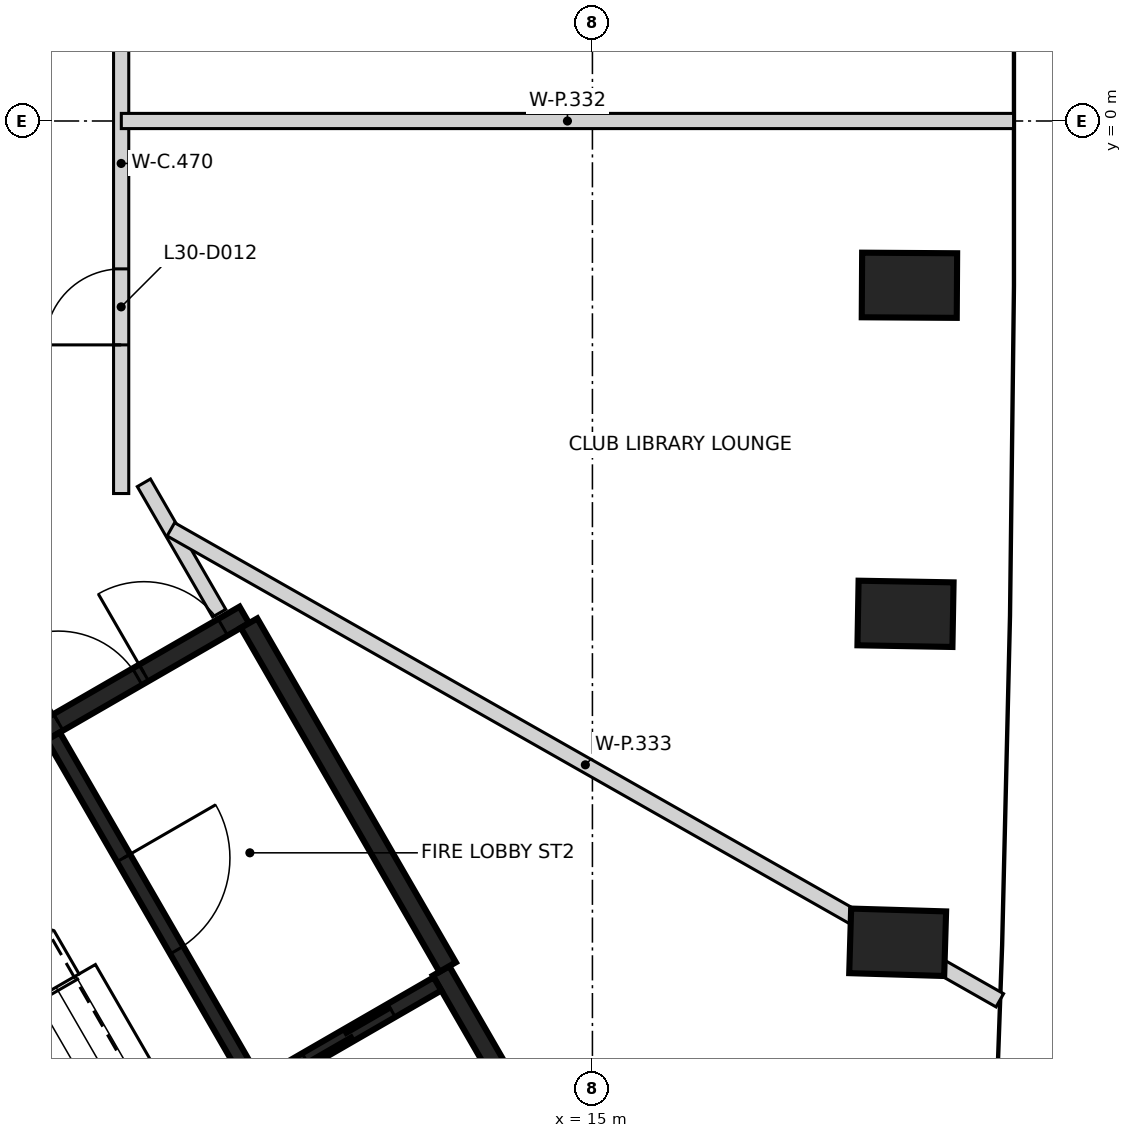
"""IFC4 building model, lengths in metres.
Left out: names, types, materials, properties, quantities, classifications, styles, units other than length and angle.
Written with IfcOpenShell. Run it as: python <this file> out.ifc"""

import sys

from ifc_helpers import new_model, si_unit, direction, frame, frame_2d, origin, origin_2d, place, context, subcontext, project, spatial, rectangle, extrude, element, fill, save


model = new_model("IFC4")
c1 = context("Model", 3, precision=1e-05, world=origin(), true_north=direction((0.0, 1.0)))
c2 = subcontext(c1, "Body", "Model", "MODEL_VIEW")
j1 = project(units=[si_unit("LENGTHUNIT", "METRE"), si_unit("PLANEANGLEUNIT", "RADIAN")], contexts=[c1])
p1 = place(None, origin())
s1 = spatial("IfcSite", under=j1, at=p1, CompositionType="ELEMENT")
p2 = place(p1, origin())
s2 = spatial("IfcBuilding", under=s1, at=p2, CompositionType="ELEMENT")
p3 = place(p2, frame((0.0, 0.0, 123.8)))
s3 = spatial("IfcBuildingStorey", under=s2, at=p3, CompositionType="ELEMENT", Elevation=123.8)
for number, where, z_axis, x_axis in (
    (1, (19.016, -10.805, -0.4), (0.0, 0.0, 1.0), (-1.0, 0.03, 0.0)),
    (2, (19.119, -6.484, -0.4), (0.0, 0.0, 1.0), (-1.0, 0.018, 0.0)),
    (3, (19.171, -2.161, -0.4), (0.0, 0.0, 1.0), (-1.0, 0.006, 0.0)),
):
    element("IfcColumn", number, at=place(p3, frame(where, z_axis=z_axis, x_axis=x_axis)), inside=s3, PredefinedType="COLUMN", context=c2, shape_type="SweptSolid", body=[
        extrude(rectangle(XDim=1.25, YDim=0.85, at=origin_2d()), origin(), (0.0, 0.0, 1.0), 5.0),
    ])
p4 = place(p3, frame((0.417, -12.273, 0.0), z_axis=(0.0, 0.0, 1.0), x_axis=(0.866021906294, 0.500006057782, 0.0)))
e4 = element("IfcWall", 4, at=p4, inside=s3, PredefinedType="SHEAR", context=c2, shape_type="SweptSolid", body=[
    extrude(rectangle(XDim=11.55, YDim=0.25, at=frame_2d((5.775, 0.0))), origin(), (0.0, 0.0, 1.0), 4.6),
])
p5 = place(p4, frame((10.025, 0.0, 0.0)))
e5 = element("IfcOpeningElement", 5, at=p5, cuts=e4, PredefinedType="OPENING", context=c2, shape_type="SweptSolid", body=[
    extrude(rectangle(XDim=1.2, YDim=2.1, at=frame_2d((0.6, 1.05))), frame((0.0, 0.135, 0.0), z_axis=(0.0, -1.0, 0.0), x_axis=(1.0, 0.0, 0.0)), (0.0, 0.0, 1.0), 0.27),
])
p6 = place(p4, frame((8.725, 0.0, 0.0)))
e6 = element("IfcOpeningElement", 6, at=p6, cuts=e4, PredefinedType="OPENING", context=c2, shape_type="SweptSolid", body=[
    extrude(rectangle(XDim=1.2, YDim=2.1, at=frame_2d((0.6, 1.05))), frame((0.0, 0.135, 0.0), z_axis=(0.0, -1.0, 0.0), x_axis=(1.0, 0.0, 0.0)), (0.0, 0.0, 1.0), 0.27),
])
p7 = place(p3, frame((13.008, -11.181, 0.0), z_axis=(0.0, 0.0, 1.0), x_axis=(0.500004234368, -0.866022959057, 0.0)))
e7 = element("IfcWall", 7, at=p7, inside=s3, PredefinedType="SHEAR", context=c2, shape_type="SweptSolid", body=[
    extrude(rectangle(XDim=6.25, YDim=0.25, at=frame_2d((3.125, 0.0))), origin(), (0.0, 0.0, 1.0), 4.6),
])
p8 = place(p3, frame((10.483, -6.606, 0.0), z_axis=(0.0, 0.0, 1.0), x_axis=(0.49999885962, -0.866026062182, 0.0)))
e8 = element("IfcWall", 8, at=p8, inside=s3, PredefinedType="SHEAR", context=c2, shape_type="SweptSolid", body=[
    extrude(rectangle(XDim=5.225, YDim=0.25, at=frame_2d((2.612, 0.0))), origin(), (0.0, 0.0, 1.0), 4.6),
])
p9 = place(p3, frame((7.906, -8.094, 0.0), z_axis=(0.0, 0.0, 1.0), x_axis=(0.500024287448, -0.866011380966, 0.0)))
e9 = element("IfcWall", 9, at=p9, inside=s3, PredefinedType="SHEAR", context=c2, shape_type="SweptSolid", body=[
    extrude(rectangle(XDim=5.251, YDim=0.2, at=frame_2d((2.625, 0.0))), origin(), (0.0, 0.0, 1.0), 4.6),
])
p10 = place(p9, frame((1.849, 0.0, 0.0)))
e10 = element("IfcOpeningElement", 10, at=p10, cuts=e9, PredefinedType="OPENING", context=c2, shape_type="SweptSolid", body=[
    extrude(rectangle(XDim=1.4, YDim=2.1, at=frame_2d((0.7, 1.05))), frame((0.0, 0.11, 0.0), z_axis=(0.0, -1.0, 0.0), x_axis=(1.0, 0.0, 0.0)), (0.0, 0.0, 1.0), 0.22),
])
p11 = place(p3, frame((10.587, -12.723, 0.0), z_axis=(0.0, 0.0, 1.0), x_axis=(0.866037306777, 0.499979382845, 0.0)))
e11 = element("IfcWall", 11, at=p11, inside=s3, PredefinedType="SHEAR", context=c2, shape_type="SweptSolid", body=[
    extrude(rectangle(XDim=2.742, YDim=0.2, at=frame_2d((1.371, 0.0))), origin(), (0.0, 0.0, 1.0), 4.6),
])
p12 = place(p11, frame((0.743, 0.0, 0.0)))
e12 = element("IfcOpeningElement", 12, at=p12, cuts=e11, PredefinedType="OPENING", context=c2, shape_type="SweptSolid", body=[
    extrude(rectangle(XDim=1.3, YDim=2.1, at=frame_2d((0.65, 1.05))), frame((0.0, 0.11, 0.0), z_axis=(0.0, -1.0, 0.0), x_axis=(1.0, 0.0, 0.0)), (0.0, 0.0, 1.0), 0.22),
])
p13 = place(p3, frame((8.8, -4.901, 0.0), z_axis=(0.0, 0.0, 1.0), x_axis=(0.0, 1.0, 0.0)))
e13 = element("IfcWall", 13, at=p13, inside=s3, PredefinedType="PARTITIONING", context=c2, shape_type="SweptSolid", body=[
    extrude(rectangle(XDim=8.685, YDim=0.2, at=frame_2d((4.342, 0.0))), origin(), (0.0, 0.0, 1.0), 4.6),
])
p14 = place(p13, frame((1.956, 0.0, 0.0)))
e14 = element("IfcOpeningElement", 14, at=p14, cuts=e13, PredefinedType="OPENING", context=c2, shape_type="SweptSolid", body=[
    extrude(rectangle(XDim=1.0, YDim=2.1, at=frame_2d((0.5, 1.05))), frame((0.0, 0.11, 0.0), z_axis=(0.0, -1.0, 0.0), x_axis=(1.0, 0.0, 0.0)), (0.0, 0.0, 1.0), 0.22),
])
p15 = place(p3, frame((9.099, -4.76, 0.0), z_axis=(0.0, 0.0, 1.0), x_axis=(0.500195451667, -0.865912530301, 0.0)))
e15 = element("IfcWall", 15, at=p15, inside=s3, PredefinedType="PARTITIONING", context=c2, shape_type="SweptSolid", body=[
    extrude(rectangle(XDim=1.981, YDim=0.2, at=frame_2d((0.99, 0.0))), origin(), (0.0, 0.0, 1.0), 4.6),
])
p16 = place(p3, frame((8.802, 0.0, 0.0), z_axis=(0.0, 0.0, 1.0), x_axis=(1.0, 0.0, 0.0)))
e16 = element("IfcWall", 16, at=p16, inside=s3, PredefinedType="PARTITIONING", context=c2, shape_type="SweptSolid", body=[
    extrude(rectangle(XDim=11.739, YDim=0.2, at=frame_2d((5.869, 0.0))), origin(), (0.0, 0.0, 1.0), 3.7),
])
p17 = place(p3, frame((9.454, -5.372, 0.0), z_axis=(0.0, 0.0, 1.0), x_axis=(0.869462257487, -0.493999375308, 0.0)))
e17 = element("IfcWall", 17, at=p17, inside=s3, PredefinedType="PARTITIONING", context=c2, shape_type="SweptSolid", body=[
    extrude(rectangle(XDim=12.543, YDim=0.2, at=frame_2d((6.271, 0.0))), origin(), (0.0, 0.0, 1.0), 4.6),
])
p18 = place(p12, origin())
e18 = element("IfcDoor", 18, at=p18, inside=s3, OperationType="SLIDING_TO_LEFT", PredefinedType="DOOR", context=c2, shape_type="SweptSolid", body=[
    extrude(rectangle(XDim=1.3, YDim=2.1, at=frame_2d((0.65, 1.05))), frame((0.0, 0.025, 0.0), z_axis=(0.0, -1.0, 0.0), x_axis=(1.0, 0.0, 0.0)), (0.0, 0.0, 1.0), 0.05),
])
fill(e12, e18)
p19 = place(p5, origin())
e19 = element("IfcDoor", 19, at=p19, inside=s3, OperationType="SINGLE_SWING_LEFT", PredefinedType="DOOR", context=c2, shape_type="SweptSolid", body=[
    extrude(rectangle(XDim=1.2, YDim=2.1, at=frame_2d((0.6, 1.05))), frame((0.0, 0.025, 0.0), z_axis=(0.0, -1.0, 0.0), x_axis=(1.0, 0.0, 0.0)), (0.0, 0.0, 1.0), 0.05),
])
fill(e5, e19)
p20 = place(p6, origin())
e20 = element("IfcDoor", 20, at=p20, inside=s3, OperationType="SINGLE_SWING_RIGHT", PredefinedType="DOOR", context=c2, shape_type="SweptSolid", body=[
    extrude(rectangle(XDim=1.2, YDim=2.1, at=frame_2d((0.6, 1.05))), frame((0.0, 0.025, 0.0), z_axis=(0.0, -1.0, 0.0), x_axis=(1.0, 0.0, 0.0)), (0.0, 0.0, 1.0), 0.05),
])
fill(e6, e20)
p21 = place(p10, origin())
e21 = element("IfcDoor", 21, at=p21, inside=s3, OperationType="SINGLE_SWING_LEFT", PredefinedType="DOOR", context=c2, shape_type="SweptSolid", body=[
    extrude(rectangle(XDim=1.4, YDim=2.1, at=frame_2d((0.7, 1.05))), frame((0.0, 0.025, 0.0), z_axis=(0.0, -1.0, 0.0), x_axis=(1.0, 0.0, 0.0)), (0.0, 0.0, 1.0), 0.05),
])
fill(e10, e21)
p22 = place(p14, frame((1.0, 0.0, 0.0), z_axis=(0.0, 0.0, 1.0), x_axis=(-1.0, 0.0, 0.0)))
e22 = element("IfcDoor", 22, at=p22, inside=s3, OperationType="SINGLE_SWING_LEFT", PredefinedType="DOOR", context=c2, shape_type="SweptSolid", body=[
    extrude(rectangle(XDim=1.0, YDim=2.1, at=frame_2d((0.5, 1.05))), frame((0.0, 0.025, 0.0), z_axis=(0.0, -1.0, 0.0), x_axis=(1.0, 0.0, 0.0)), (0.0, 0.0, 1.0), 0.05),
])
fill(e14, e22)
save(model, sys.argv[1])
